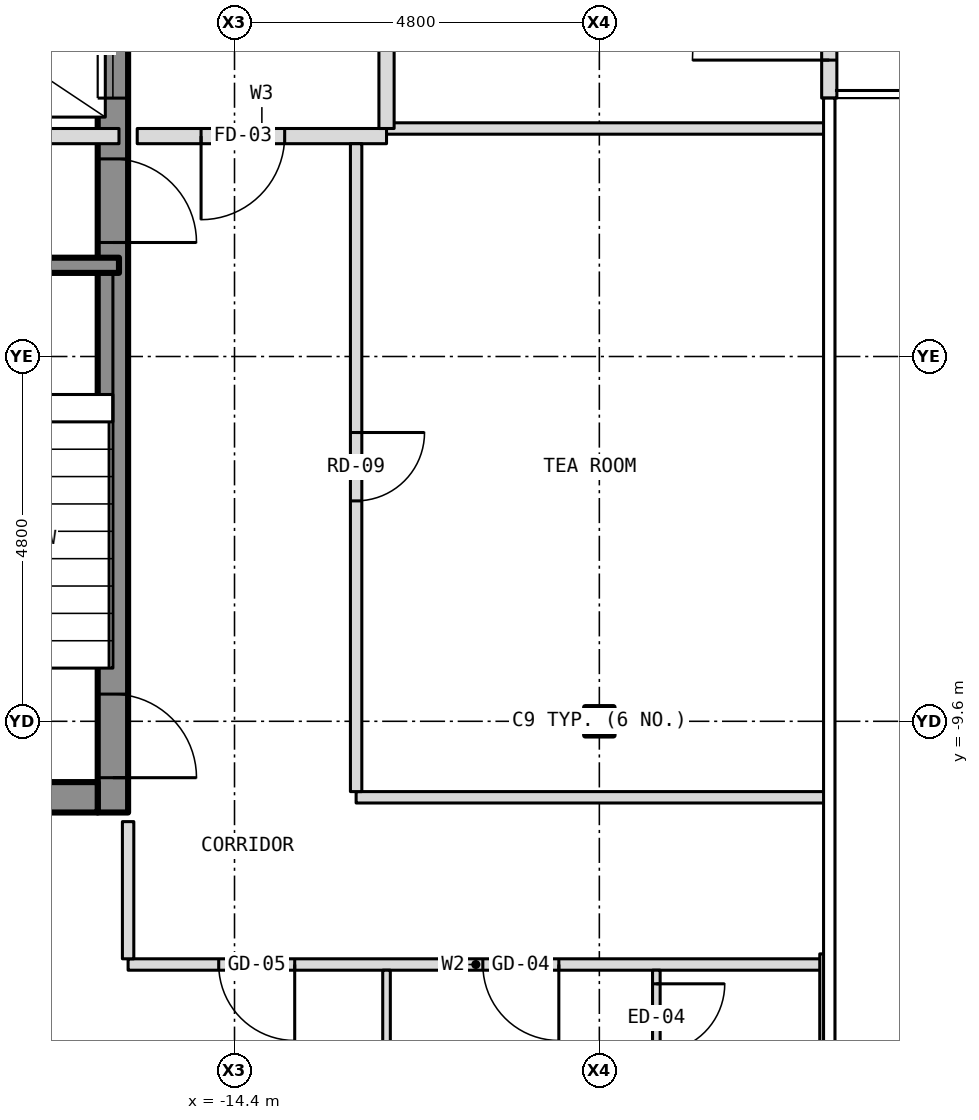
"""IFC4 building model, lengths in metres.
Left out: names, types, materials, properties, quantities, classifications, styles, units other than length and angle.
Written with IfcOpenShell. Run it as: python <this file> out.ifc"""

import sys

from ifc_helpers import new_model, si_unit, direction, frame, frame_2d, origin, origin_2d, place, context, subcontext, project, spatial, rectangle, i_section, extrude, element, fill, save


model = new_model("IFC4")
c1 = context("Model", 3, precision=1e-05, world=origin(), true_north=direction((0.0, 1.0)))
c2 = subcontext(c1, "Body", "Model", "MODEL_VIEW")
j1 = project(units=[si_unit("LENGTHUNIT", "METRE"), si_unit("PLANEANGLEUNIT", "RADIAN")], contexts=[c1])
p1 = place(None, origin())
s1 = spatial("IfcSite", under=j1, at=p1, CompositionType="ELEMENT")
p2 = place(p1, origin())
s2 = spatial("IfcBuilding", under=s1, at=p2, CompositionType="ELEMENT")
p3 = place(p2, frame((0.0, 0.0, 222.5)))
s3 = spatial("IfcBuildingStorey", under=s2, at=p3, CompositionType="ELEMENT", Elevation=222.5)
p4 = place(p3, frame((-9.6, -9.6, -0.15), z_axis=(0.0, 0.0, 1.0), x_axis=(1.0, 0.0, 0.0)))
e1 = element("IfcColumn", 1, at=p4, inside=s3, PredefinedType="COLUMN", context=c2, shape_type="SweptSolid", body=[
    extrude(i_section(OverallWidth=0.373, OverallDepth=0.373, WebThickness=0.016, FlangeThickness=0.026, at=origin_2d()), origin(), (0.0, 0.0, 1.0), 3.5),
])
p5 = place(p3, frame((-16.0, -10.8, 0.0), z_axis=(0.0, 0.0, 1.0), x_axis=(0.0, 1.0, 0.0)))
e2 = element("IfcWall", 2, at=p5, inside=s3, PredefinedType="SHEAR", context=c2, shape_type="SweptSolid", body=[
    extrude(rectangle(XDim=21.6, YDim=0.4, at=frame_2d((10.8, 0.0))), origin(), (0.0, 0.0, 1.0), 3.25),
])
p6 = place(p5, frame((9.4, 0.0, 0.0)))
e3 = element("IfcOpeningElement", 3, at=p6, cuts=e2, PredefinedType="OPENING", context=c2, shape_type="SweptSolid", body=[
    extrude(rectangle(XDim=1.1, YDim=2.1, at=frame_2d((0.55, 1.05))), frame((0.0, 0.212, 0.0), z_axis=(0.0, -1.0, 0.0), x_axis=(1.0, 0.0, 0.0)), (0.0, 0.0, 1.0), 0.424),
])
p7 = place(p5, frame((11.5, 0.0, 0.0)))
e4 = element("IfcOpeningElement", 4, at=p7, cuts=e2, PredefinedType="OPENING", context=c2, shape_type="SweptSolid", body=[
    extrude(rectangle(XDim=1.1, YDim=2.1, at=frame_2d((0.55, 1.05))), frame((0.0, 0.212, 0.0), z_axis=(0.0, -1.0, 0.0), x_axis=(1.0, 0.0, 0.0)), (0.0, 0.0, 1.0), 0.424),
])
p8 = place(p5, frame((13.6, 0.0, 0.0)))
e5 = element("IfcOpeningElement", 5, at=p8, cuts=e2, PredefinedType="OPENING", context=c2, shape_type="SweptSolid", body=[
    extrude(rectangle(XDim=1.1, YDim=2.1, at=frame_2d((0.55, 1.05))), frame((0.0, 0.212, 0.0), z_axis=(0.0, -1.0, 0.0), x_axis=(1.0, 0.0, 0.0)), (0.0, 0.0, 1.0), 0.424),
])
p9 = place(p5, frame((15.7, 0.0, 0.0)))
e6 = element("IfcOpeningElement", 6, at=p9, cuts=e2, PredefinedType="OPENING", context=c2, shape_type="SweptSolid", body=[
    extrude(rectangle(XDim=1.1, YDim=2.1, at=frame_2d((0.55, 1.05))), frame((0.0, 0.212, 0.0), z_axis=(0.0, -1.0, 0.0), x_axis=(1.0, 0.0, 0.0)), (0.0, 0.0, 1.0), 0.424),
])
p10 = place(p5, frame((17.8, 0.0, 0.0)))
e7 = element("IfcOpeningElement", 7, at=p10, cuts=e2, PredefinedType="OPENING", context=c2, shape_type="SweptSolid", body=[
    extrude(rectangle(XDim=1.1, YDim=2.1, at=frame_2d((0.55, 1.05))), frame((0.0, 0.212, 0.0), z_axis=(0.0, -1.0, 0.0), x_axis=(1.0, 0.0, 0.0)), (0.0, 0.0, 1.0), 0.424),
])
p11 = place(p5, frame((0.458, 0.0, 0.0)))
e8 = element("IfcOpeningElement", 8, at=p11, cuts=e2, PredefinedType="OPENING", context=c2, shape_type="SweptSolid", body=[
    extrude(rectangle(XDim=1.1, YDim=2.1, at=frame_2d((0.55, 1.05))), frame((0.0, 0.212, 0.0), z_axis=(0.0, -1.0, 0.0), x_axis=(1.0, 0.0, 0.0)), (0.0, 0.0, 1.0), 0.424),
])
p12 = place(p5, frame((7.5, 0.0, 0.0)))
e9 = element("IfcOpeningElement", 9, at=p12, cuts=e2, PredefinedType="OPENING", context=c2, shape_type="SweptSolid", body=[
    extrude(rectangle(XDim=1.1, YDim=2.1, at=frame_2d((0.55, 1.05))), frame((0.0, 0.212, 0.0), z_axis=(0.0, -1.0, 0.0), x_axis=(1.0, 0.0, 0.0)), (0.0, 0.0, 1.0), 0.424),
])
p13 = place(p5, frame((20.0, 0.0, 0.0)))
e10 = element("IfcOpeningElement", 10, at=p13, cuts=e2, PredefinedType="OPENING", context=c2, shape_type="SweptSolid", body=[
    extrude(rectangle(XDim=0.9, YDim=2.1, at=frame_2d((0.45, 1.05))), frame((0.0, 0.212, 0.0), z_axis=(0.0, -1.0, 0.0), x_axis=(1.0, 0.0, 0.0)), (0.0, 0.0, 1.0), 0.424),
])
p14 = place(p3, frame((-20.0, -10.6, 0.0), z_axis=(0.0, 0.0, 1.0), x_axis=(1.0, 0.0, 0.0)))
e11 = element("IfcWall", 11, at=p14, inside=s3, PredefinedType="SHEAR", context=c2, shape_type="SweptSolid", body=[
    extrude(rectangle(XDim=3.8, YDim=0.4, at=frame_2d((1.9, 0.0))), origin(), (0.0, 0.0, 1.0), 3.25),
])
p15 = place(p3, frame((-6.575, -1.4, 0.0), z_axis=(0.0, 0.0, 1.0), x_axis=(0.0, 1.0, 0.0)))
e12 = element("IfcWall", 12, at=p15, inside=s3, PredefinedType="SOLIDWALL", context=c2, shape_type="SweptSolid", body=[
    extrude(rectangle(XDim=2.8, YDim=0.2, at=frame_2d((1.4, 0.0))), origin(), (0.0, 0.0, 1.0), 3.5),
])
p16 = place(p15, frame((0.5, 0.0, 0.0)))
e13 = element("IfcOpeningElement", 13, at=p16, cuts=e12, PredefinedType="OPENING", context=c2, shape_type="SweptSolid", body=[
    extrude(rectangle(XDim=1.8, YDim=2.1, at=frame_2d((0.9, 1.05))), frame((0.0, 0.112, 0.0), z_axis=(0.0, -1.0, 0.0), x_axis=(1.0, 0.0, 0.0)), (0.0, 0.0, 1.0), 0.224),
])
p17 = place(p3, frame((-15.8, -12.8, 0.0), z_axis=(0.0, 0.0, 1.0), x_axis=(1.0, 0.0, 0.0)))
e14 = element("IfcWall", 14, at=p17, inside=s3, PredefinedType="PARTITIONING", context=c2, shape_type="SweptSolid", body=[
    extrude(rectangle(XDim=9.15, YDim=0.15, at=frame_2d((4.575, 0.0))), origin(), (0.0, 0.0, 1.0), 3.35),
])
p18 = place(p17, frame((4.667, 0.0, 0.0)))
e15 = element("IfcOpeningElement", 15, at=p18, cuts=e14, PredefinedType="OPENING", context=c2, shape_type="SweptSolid", body=[
    extrude(rectangle(XDim=1.0, YDim=2.1, at=frame_2d((0.5, 1.05))), frame((0.0, 0.087, 0.0), z_axis=(0.0, -1.0, 0.0), x_axis=(1.0, 0.0, 0.0)), (0.0, 0.0, 1.0), 0.174),
])
p19 = place(p17, frame((1.192, 0.0, 0.0)))
e16 = element("IfcOpeningElement", 16, at=p19, cuts=e14, PredefinedType="OPENING", context=c2, shape_type="SweptSolid", body=[
    extrude(rectangle(XDim=1.0, YDim=2.1, at=frame_2d((0.5, 1.05))), frame((0.0, 0.087, 0.0), z_axis=(0.0, -1.0, 0.0), x_axis=(1.0, 0.0, 0.0)), (0.0, 0.0, 1.0), 0.174),
])
p20 = place(p3, frame((-12.8, -10.6, 0.0), z_axis=(0.0, 0.0, 1.0), x_axis=(1.0, 0.0, 0.0)))
e17 = element("IfcWall", 17, at=p20, inside=s3, PredefinedType="PARTITIONING", context=c2, shape_type="SweptSolid", body=[
    extrude(rectangle(XDim=6.18, YDim=0.15, at=frame_2d((3.09, 0.0))), origin(), (0.0, 0.0, 1.0), 3.35),
])
p21 = place(p3, frame((-20.28, -3.6, 0.0), z_axis=(0.0, 0.0, 1.0), x_axis=(1.0, 0.0, 0.0)))
e18 = element("IfcWall", 18, at=p21, inside=s3, PredefinedType="SHEAR", context=c2, shape_type="SweptSolid", body=[
    extrude(rectangle(XDim=4.36, YDim=0.2, at=frame_2d((2.18, 0.0))), origin(), (0.0, 0.0, 1.0), 3.25),
])
p22 = place(p3, frame((-20.28, -1.9, 0.0), z_axis=(0.0, 0.0, 1.0), x_axis=(1.0, 0.0, 0.0)))
e19 = element("IfcWall", 19, at=p22, inside=s3, PredefinedType="PARTITIONING", context=c2, shape_type="SweptSolid", body=[
    extrude(rectangle(XDim=4.36, YDim=0.2, at=frame_2d((2.18, 0.0))), origin(), (0.0, 0.0, 1.0), 3.25),
])
p23 = place(p22, frame((0.28, 0.0, 0.0)))
e20 = element("IfcOpeningElement", 20, at=p23, cuts=e19, PredefinedType="OPENING", context=c2, shape_type="SweptSolid", body=[
    extrude(rectangle(XDim=0.9, YDim=2.1, at=frame_2d((0.45, 1.05))), frame((0.0, 0.112, 0.0), z_axis=(0.0, -1.0, 0.0), x_axis=(1.0, 0.0, 0.0)), (0.0, 0.0, 1.0), 0.224),
])
p24 = place(p3, frame((-15.68, -1.9, 0.0), z_axis=(0.0, 0.0, 1.0), x_axis=(1.0, 0.0, 0.0)))
e21 = element("IfcWall", 21, at=p24, inside=s3, PredefinedType="PARTITIONING", context=c2, shape_type="SweptSolid", body=[
    extrude(rectangle(XDim=3.28, YDim=0.2, at=frame_2d((1.64, 0.0))), origin(), (0.0, 0.0, 1.0), 3.35),
])
p25 = place(p24, frame((0.84, 0.0, 0.0)))
e22 = element("IfcOpeningElement", 22, at=p25, cuts=e21, PredefinedType="OPENING", context=c2, shape_type="SweptSolid", body=[
    extrude(rectangle(XDim=1.1, YDim=2.1, at=frame_2d((0.55, 1.05))), frame((0.0, 0.112, 0.0), z_axis=(0.0, -1.0, 0.0), x_axis=(1.0, 0.0, 0.0)), (0.0, 0.0, 1.0), 0.224),
])
p26 = place(p3, frame((-12.4, -1.8, 0.0), z_axis=(0.0, 0.0, 1.0), x_axis=(1.0, 0.0, 0.0)))
e23 = element("IfcWall", 23, at=p26, inside=s3, PredefinedType="PARTITIONING", context=c2, shape_type="SweptSolid", body=[
    extrude(rectangle(XDim=5.78, YDim=0.15, at=frame_2d((2.89, 0.0))), origin(), (0.0, 0.0, 1.0), 3.35),
])
p27 = place(p3, frame((-15.8, -12.725, 0.0), z_axis=(0.0, 0.0, 1.0), x_axis=(0.0, 1.0, 0.0)))
e24 = element("IfcWall", 24, at=p27, inside=s3, PredefinedType="PARTITIONING", context=c2, shape_type="SweptSolid", body=[
    extrude(rectangle(XDim=1.805, YDim=0.15, at=frame_2d((0.903, 0.0))), origin(), (0.0, 0.0, 1.0), 3.35),
])
p28 = place(p3, frame((-12.8, -10.525, 0.0), z_axis=(0.0, 0.0, 1.0), x_axis=(0.0, 1.0, 0.0)))
e25 = element("IfcWall", 25, at=p28, inside=s3, PredefinedType="PARTITIONING", context=c2, shape_type="SweptSolid", body=[
    extrude(rectangle(XDim=8.525, YDim=0.15, at=frame_2d((4.262, 0.0))), origin(), (0.0, 0.0, 1.0), 3.35),
])
p29 = place(p28, frame((3.825, 0.0, 0.0)))
e26 = element("IfcOpeningElement", 26, at=p29, cuts=e25, PredefinedType="OPENING", context=c2, shape_type="SweptSolid", body=[
    extrude(rectangle(XDim=0.9, YDim=2.1, at=frame_2d((0.45, 1.05))), frame((0.0, 0.087, 0.0), z_axis=(0.0, -1.0, 0.0), x_axis=(1.0, 0.0, 0.0)), (0.0, 0.0, 1.0), 0.174),
])
p30 = place(p3, frame((-12.4, -20.78, 0.0), z_axis=(0.0, 0.0, 1.0), x_axis=(0.0, 1.0, 0.0)))
e27 = element("IfcWall", 27, at=p30, inside=s3, PredefinedType="PARTITIONING", context=c2, shape_type="SweptSolid", body=[
    extrude(rectangle(XDim=7.905, YDim=0.1, at=frame_2d((3.953, 0.0))), origin(), (0.0, 0.0, 1.0), 3.35),
])
p31 = place(p3, frame((-12.4, -1.8, 0.0), z_axis=(0.0, 0.0, 1.0), x_axis=(0.0, 1.0, 0.0)))
e28 = element("IfcWall", 28, at=p31, inside=s3, PredefinedType="PARTITIONING", context=c2, shape_type="SweptSolid", body=[
    extrude(rectangle(XDim=4.0, YDim=0.2, at=frame_2d((2.0, 0.0))), origin(), (0.0, 0.0, 1.0), 3.35),
])
p32 = place(p31, frame((1.25, 0.0, 0.0)))
e29 = element("IfcOpeningElement", 29, at=p32, cuts=e28, PredefinedType="OPENING", context=c2, shape_type="SweptSolid", body=[
    extrude(rectangle(XDim=1.1, YDim=2.1, at=frame_2d((0.55, 1.05))), frame((0.0, 0.112, 0.0), z_axis=(0.0, -1.0, 0.0), x_axis=(1.0, 0.0, 0.0)), (0.0, 0.0, 1.0), 0.224),
])
p33 = place(p3, frame((-8.85, -15.95, 0.0), z_axis=(0.0, 0.0, 1.0), x_axis=(0.0, 1.0, 0.0)))
e30 = element("IfcWall", 30, at=p33, inside=s3, PredefinedType="PARTITIONING", context=c2, shape_type="SweptSolid", body=[
    extrude(rectangle(XDim=3.075, YDim=0.1, at=frame_2d((1.538, 0.0))), origin(), (0.0, 0.0, 1.0), 3.35),
])
p34 = place(p33, frame((1.996, 0.0, 0.0)))
e31 = element("IfcOpeningElement", 31, at=p34, cuts=e30, PredefinedType="OPENING", context=c2, shape_type="SweptSolid", body=[
    extrude(rectangle(XDim=0.9, YDim=2.1, at=frame_2d((0.45, 1.05))), frame((0.0, 0.062, 0.0), z_axis=(0.0, -1.0, 0.0), x_axis=(1.0, 0.0, 0.0)), (0.0, 0.0, 1.0), 0.124),
])
p35 = place(p3, frame((-6.65, -16.14, 0.0), z_axis=(0.0, 0.0, 1.0), x_axis=(0.0, 1.0, 0.0)))
e32 = element("IfcWall", 32, at=p35, inside=s3, PredefinedType="PARTITIONING", context=c2, shape_type="SweptSolid", body=[
    extrude(rectangle(XDim=3.48, YDim=0.1, at=frame_2d((1.74, 0.0))), origin(), (0.0, 0.0, 1.0), 3.35),
])
p36 = place(p16, origin())
e33 = element("IfcDoor", 33, at=p36, inside=s3, OperationType="DOUBLE_DOOR_DOUBLE_SWING", PredefinedType="DOOR", context=c2, shape_type="SweptSolid", body=[
    extrude(rectangle(XDim=1.8, YDim=2.1, at=frame_2d((0.9, 1.05))), frame((0.0, 0.025, 0.0), z_axis=(0.0, -1.0, 0.0), x_axis=(1.0, 0.0, 0.0)), (0.0, 0.0, 1.0), 0.05),
])
fill(e13, e33)
p37 = place(p6, origin())
e34 = element("IfcDoor", 34, at=p37, inside=s3, OperationType="SLIDING_TO_LEFT", PredefinedType="DOOR", context=c2, shape_type="SweptSolid", body=[
    extrude(rectangle(XDim=1.1, YDim=2.1, at=frame_2d((0.55, 1.05))), frame((0.0, 0.025, 0.0), z_axis=(0.0, -1.0, 0.0), x_axis=(1.0, 0.0, 0.0)), (0.0, 0.0, 1.0), 0.05),
])
fill(e3, e34)
p38 = place(p11, origin())
e35 = element("IfcDoor", 35, at=p38, inside=s3, OperationType="SINGLE_SWING_LEFT", PredefinedType="DOOR", context=c2, shape_type="SweptSolid", body=[
    extrude(rectangle(XDim=1.1, YDim=2.1, at=frame_2d((0.55, 1.05))), frame((0.0, 0.025, 0.0), z_axis=(0.0, -1.0, 0.0), x_axis=(1.0, 0.0, 0.0)), (0.0, 0.0, 1.0), 0.05),
])
fill(e8, e35)
p39 = place(p12, origin())
e36 = element("IfcDoor", 36, at=p39, inside=s3, OperationType="SINGLE_SWING_LEFT", PredefinedType="DOOR", context=c2, shape_type="SweptSolid", body=[
    extrude(rectangle(XDim=1.1, YDim=2.1, at=frame_2d((0.55, 1.05))), frame((0.0, 0.025, 0.0), z_axis=(0.0, -1.0, 0.0), x_axis=(1.0, 0.0, 0.0)), (0.0, 0.0, 1.0), 0.05),
])
fill(e9, e36)
p40 = place(p25, origin())
e37 = element("IfcDoor", 37, at=p40, inside=s3, OperationType="SINGLE_SWING_LEFT", PredefinedType="DOOR", context=c2, shape_type="SweptSolid", body=[
    extrude(rectangle(XDim=1.1, YDim=2.1, at=frame_2d((0.55, 1.05))), frame((0.0, 0.025, 0.0), z_axis=(0.0, -1.0, 0.0), x_axis=(1.0, 0.0, 0.0)), (0.0, 0.0, 1.0), 0.05),
])
fill(e22, e37)
p41 = place(p18, origin())
e38 = element("IfcDoor", 38, at=p41, inside=s3, OperationType="SINGLE_SWING_RIGHT", PredefinedType="DOOR", context=c2, shape_type="SweptSolid", body=[
    extrude(rectangle(XDim=1.0, YDim=2.1, at=frame_2d((0.5, 1.05))), frame((0.0, 0.025, 0.0), z_axis=(0.0, -1.0, 0.0), x_axis=(1.0, 0.0, 0.0)), (0.0, 0.0, 1.0), 0.05),
])
fill(e15, e38)
p42 = place(p34, origin())
e39 = element("IfcDoor", 39, at=p42, inside=s3, OperationType="SINGLE_SWING_RIGHT", PredefinedType="DOOR", context=c2, shape_type="SweptSolid", body=[
    extrude(rectangle(XDim=0.9, YDim=2.1, at=frame_2d((0.45, 1.05))), frame((0.0, 0.025, 0.0), z_axis=(0.0, -1.0, 0.0), x_axis=(1.0, 0.0, 0.0)), (0.0, 0.0, 1.0), 0.05),
])
fill(e31, e39)
p43 = place(p19, origin())
e40 = element("IfcDoor", 40, at=p43, inside=s3, OperationType="SINGLE_SWING_RIGHT", PredefinedType="DOOR", context=c2, shape_type="SweptSolid", body=[
    extrude(rectangle(XDim=1.0, YDim=2.1, at=frame_2d((0.5, 1.05))), frame((0.0, 0.025, 0.0), z_axis=(0.0, -1.0, 0.0), x_axis=(1.0, 0.0, 0.0)), (0.0, 0.0, 1.0), 0.05),
])
fill(e16, e40)
p44 = place(p29, origin())
e41 = element("IfcDoor", 41, at=p44, inside=s3, OperationType="SINGLE_SWING_RIGHT", PredefinedType="DOOR", context=c2, shape_type="SweptSolid", body=[
    extrude(rectangle(XDim=0.9, YDim=2.1, at=frame_2d((0.45, 1.05))), frame((0.0, 0.025, 0.0), z_axis=(0.0, -1.0, 0.0), x_axis=(1.0, 0.0, 0.0)), (0.0, 0.0, 1.0), 0.05),
])
fill(e26, e41)
save(model, sys.argv[1])
